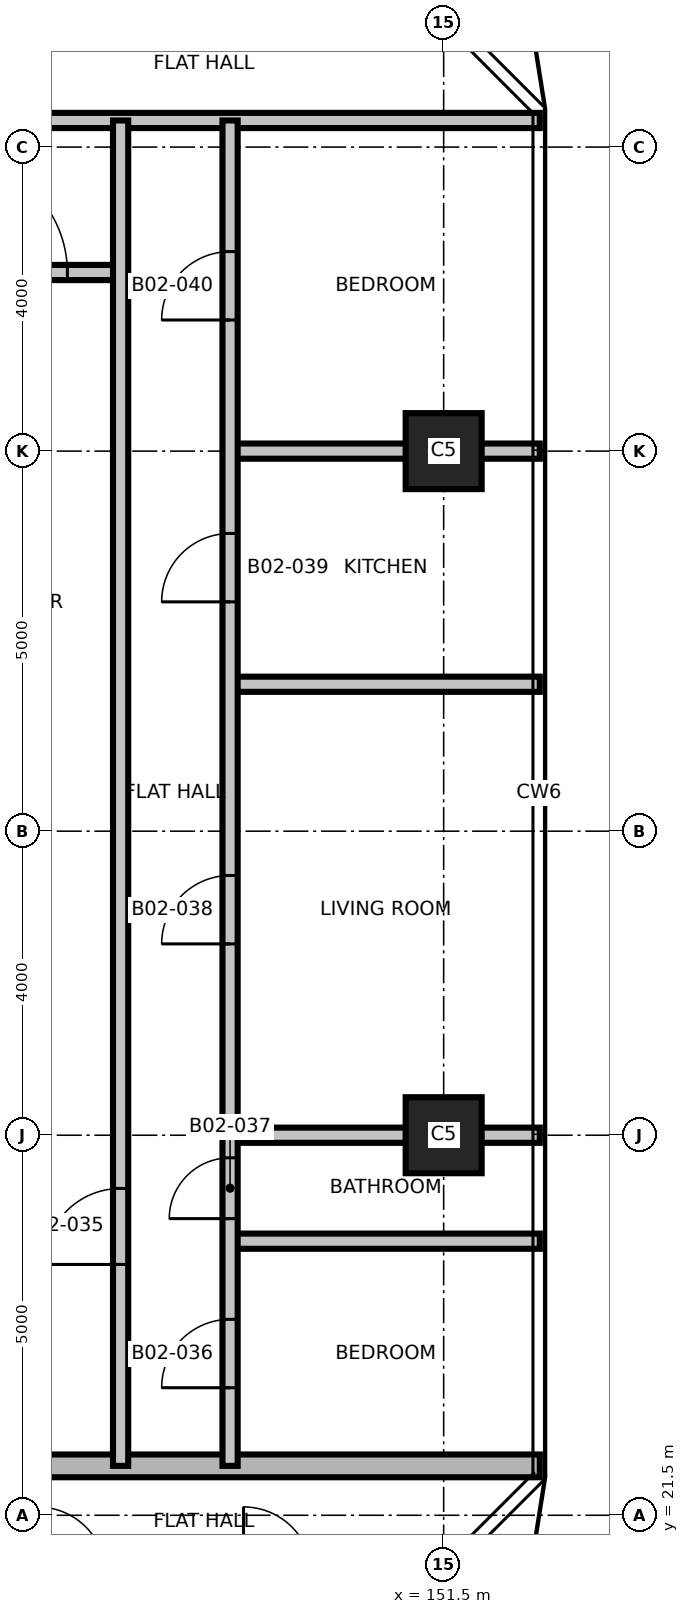
"""IFC4 building model, lengths in metres.
Left out: names, types, materials, properties, quantities, classifications, styles, units other than length and angle.
Written with IfcOpenShell. Run it as: python <this file> out.ifc"""

import sys

from ifc_helpers import new_model, si_unit, direction, frame, frame_2d, origin, origin_2d, place, context, subcontext, project, spatial, rectangle, extrude, element, fill, save


model = new_model("IFC4")
c1 = context("Model", 3, precision=1e-05, world=origin(), true_north=direction((0.0, 1.0)))
c2 = subcontext(c1, "Body", "Model", "MODEL_VIEW")
j1 = project(units=[si_unit("LENGTHUNIT", "METRE"), si_unit("PLANEANGLEUNIT", "RADIAN")], contexts=[c1])
p1 = place(None, origin())
s1 = spatial("IfcSite", under=j1, at=p1, CompositionType="ELEMENT")
p2 = place(p1, origin())
s2 = spatial("IfcBuilding", under=s1, at=p2, CompositionType="ELEMENT")
p3 = place(p2, frame((0.0, 0.0, 44.6)))
s3 = spatial("IfcBuildingStorey", under=s2, at=p3, CompositionType="ELEMENT", Elevation=44.6)
for number, where, z_axis, x_axis in (
    (1, (151.5, 26.5, 0.0), (0.0, 0.0, 1.0), (1.0, 0.0, 0.0)),
    (2, (151.5, 35.5, 0.0), (0.0, 0.0, 1.0), (1.0, 0.0, 0.0)),
):
    element("IfcColumn", number, at=place(p3, frame(where, z_axis=z_axis, x_axis=x_axis)), inside=s3, PredefinedType="COLUMN", context=c2, shape_type="SweptSolid", body=[
        extrude(rectangle(XDim=1.0, YDim=1.0, at=origin_2d()), origin(), (0.0, 0.0, 1.0), 3.7),
    ])
p4 = place(p3, frame((120.235, 22.15, 0.0), z_axis=(0.0, 0.0, 1.0), x_axis=(1.0, 0.0, 0.0)))
e3 = element("IfcWall", 3, at=p4, inside=s3, PredefinedType="SHEAR", context=c2, shape_type="SweptSolid", body=[
    extrude(rectangle(XDim=32.53, YDim=0.3, at=frame_2d((16.265, 0.0))), origin(), (0.0, 0.0, 1.0), 3.4),
])
p5 = place(p4, frame((22.515, 0.0, 0.0)))
e4 = element("IfcOpeningElement", 4, at=p5, cuts=e3, PredefinedType="OPENING", context=c2, shape_type="SweptSolid", body=[
    extrude(rectangle(XDim=1.0, YDim=2.1, at=frame_2d((0.5, 1.05))), frame((0.0, 0.16, 0.0), z_axis=(0.0, -1.0, 0.0), x_axis=(1.0, 0.0, 0.0)), (0.0, 0.0, 1.0), 0.32),
])
p6 = place(p4, frame((10.865, 0.0, 0.0)))
e5 = element("IfcOpeningElement", 5, at=p6, cuts=e3, PredefinedType="OPENING", context=c2, shape_type="SweptSolid", body=[
    extrude(rectangle(XDim=1.0, YDim=2.1, at=frame_2d((0.5, 1.05))), frame((0.0, 0.16, 0.0), z_axis=(0.0, -1.0, 0.0), x_axis=(1.0, 0.0, 0.0)), (0.0, 0.0, 1.0), 0.32),
])
p7 = place(p4, frame((24.415, 0.0, 0.0)))
e6 = element("IfcOpeningElement", 6, at=p7, cuts=e3, PredefinedType="OPENING", context=c2, shape_type="SweptSolid", body=[
    extrude(rectangle(XDim=1.0, YDim=2.1, at=frame_2d((0.5, 1.05))), frame((0.0, 0.16, 0.0), z_axis=(0.0, -1.0, 0.0), x_axis=(1.0, 0.0, 0.0)), (0.0, 0.0, 1.0), 0.32),
])
p8 = place(p4, frame((16.515, 0.0, 0.0)))
e7 = element("IfcOpeningElement", 7, at=p8, cuts=e3, PredefinedType="OPENING", context=c2, shape_type="SweptSolid", body=[
    extrude(rectangle(XDim=0.9, YDim=2.1, at=frame_2d((0.45, 1.05))), frame((0.0, 0.16, 0.0), z_axis=(0.0, -1.0, 0.0), x_axis=(1.0, 0.0, 0.0)), (0.0, 0.0, 1.0), 0.32),
])
for number, where, z_axis, x_axis in (
    (8, (148.69, 25.106, 0.0), (0.0, 0.0, 1.0), (1.0, 0.0, 0.0)),
    (9, (148.69, 26.5, 0.0), (0.0, 0.0, 1.0), (1.0, 0.0, 0.0)),
    (10, (148.69, 32.433, 0.0), (0.0, 0.0, 1.0), (1.0, 0.0, 0.0)),
    (11, (148.69, 35.5, 0.0), (0.0, 0.0, 1.0), (1.0, 0.0, 0.0)),
):
    element("IfcWall", number, at=place(p3, frame(where, z_axis=z_axis, x_axis=x_axis)), inside=s3, PredefinedType="PARTITIONING", context=c2, shape_type="SweptSolid", body=[
        extrude(rectangle(XDim=4.075, YDim=0.2, at=frame_2d((2.038, 0.0))), origin(), (0.0, 0.0, 1.0), 3.4),
    ])
p9 = place(p3, frame((144.02, 37.85, 0.0), z_axis=(0.0, 0.0, 1.0), x_axis=(1.0, 0.0, 0.0)))
e12 = element("IfcWall", 12, at=p9, inside=s3, PredefinedType="PARTITIONING", context=c2, shape_type="SweptSolid", body=[
    extrude(rectangle(XDim=3.23, YDim=0.2, at=frame_2d((1.615, 0.0))), origin(), (0.0, 0.0, 1.0), 3.4),
])
p10 = place(p9, frame((1.03, 0.0, 0.0)))
e13 = element("IfcOpeningElement", 13, at=p10, cuts=e12, PredefinedType="OPENING", context=c2, shape_type="SweptSolid", body=[
    extrude(rectangle(XDim=1.5, YDim=2.1, at=frame_2d((0.75, 1.05))), frame((0.0, 0.11, 0.0), z_axis=(0.0, -1.0, 0.0), x_axis=(1.0, 0.0, 0.0)), (0.0, 0.0, 1.0), 0.22),
])
p11 = place(p3, frame((120.235, 39.85, 0.0), z_axis=(0.0, 0.0, 1.0), x_axis=(1.0, 0.0, 0.0)))
e14 = element("IfcWall", 14, at=p11, inside=s3, PredefinedType="PARTITIONING", context=c2, shape_type="SweptSolid", body=[
    extrude(rectangle(XDim=32.53, YDim=0.2, at=frame_2d((16.265, 0.0))), origin(), (0.0, 0.0, 1.0), 3.4),
])
p12 = place(p11, frame((7.115, 0.0, 0.0)))
e15 = element("IfcOpeningElement", 15, at=p12, cuts=e14, PredefinedType="OPENING", context=c2, shape_type="SweptSolid", body=[
    extrude(rectangle(XDim=1.0, YDim=2.1, at=frame_2d((0.5, 1.05))), frame((0.0, 0.11, 0.0), z_axis=(0.0, -1.0, 0.0), x_axis=(1.0, 0.0, 0.0)), (0.0, 0.0, 1.0), 0.22),
])
p13 = place(p11, frame((15.765, 0.0, 0.0)))
e16 = element("IfcOpeningElement", 16, at=p13, cuts=e14, PredefinedType="OPENING", context=c2, shape_type="SweptSolid", body=[
    extrude(rectangle(XDim=1.0, YDim=2.1, at=frame_2d((0.5, 1.05))), frame((0.0, 0.11, 0.0), z_axis=(0.0, -1.0, 0.0), x_axis=(1.0, 0.0, 0.0)), (0.0, 0.0, 1.0), 0.22),
])
p14 = place(p11, frame((24.415, 0.0, 0.0)))
e17 = element("IfcOpeningElement", 17, at=p14, cuts=e14, PredefinedType="OPENING", context=c2, shape_type="SweptSolid", body=[
    extrude(rectangle(XDim=1.0, YDim=2.1, at=frame_2d((0.5, 1.05))), frame((0.0, 0.11, 0.0), z_axis=(0.0, -1.0, 0.0), x_axis=(1.0, 0.0, 0.0)), (0.0, 0.0, 1.0), 0.22),
])
p15 = place(p3, frame((147.25, 22.15, 0.0), z_axis=(0.0, 0.0, 1.0), x_axis=(0.0, 1.0, 0.0)))
e18 = element("IfcWall", 18, at=p15, inside=s3, PredefinedType="PARTITIONING", context=c2, shape_type="SweptSolid", body=[
    extrude(rectangle(XDim=17.7, YDim=0.2, at=frame_2d((8.85, 0.0))), origin(), (0.0, 0.0, 1.0), 3.4),
])
p16 = place(p15, frame((2.65, 0.0, 0.0)))
e19 = element("IfcOpeningElement", 19, at=p16, cuts=e18, PredefinedType="OPENING", context=c2, shape_type="SweptSolid", body=[
    extrude(rectangle(XDim=1.0, YDim=2.1, at=frame_2d((0.5, 1.05))), frame((0.0, 0.11, 0.0), z_axis=(0.0, -1.0, 0.0), x_axis=(1.0, 0.0, 0.0)), (0.0, 0.0, 1.0), 0.22),
])
p17 = place(p3, frame((148.69, 22.15, 0.0), z_axis=(0.0, 0.0, 1.0), x_axis=(0.0, 1.0, 0.0)))
e20 = element("IfcWall", 20, at=p17, inside=s3, PredefinedType="PARTITIONING", context=c2, shape_type="SweptSolid", body=[
    extrude(rectangle(XDim=17.7, YDim=0.2, at=frame_2d((8.85, 0.0))), origin(), (0.0, 0.0, 1.0), 3.4),
])
p18 = place(p17, frame((1.028, 0.0, 0.0)))
e21 = element("IfcOpeningElement", 21, at=p18, cuts=e20, PredefinedType="OPENING", context=c2, shape_type="SweptSolid", body=[
    extrude(rectangle(XDim=0.9, YDim=2.1, at=frame_2d((0.45, 1.05))), frame((0.0, 0.11, 0.0), z_axis=(0.0, -1.0, 0.0), x_axis=(1.0, 0.0, 0.0)), (0.0, 0.0, 1.0), 0.22),
])
p19 = place(p17, frame((3.253, 0.0, 0.0)))
e22 = element("IfcOpeningElement", 22, at=p19, cuts=e20, PredefinedType="OPENING", context=c2, shape_type="SweptSolid", body=[
    extrude(rectangle(XDim=0.8, YDim=2.1, at=frame_2d((0.4, 1.05))), frame((0.0, 0.11, 0.0), z_axis=(0.0, -1.0, 0.0), x_axis=(1.0, 0.0, 0.0)), (0.0, 0.0, 1.0), 0.22),
])
p20 = place(p17, frame((6.867, 0.0, 0.0)))
e23 = element("IfcOpeningElement", 23, at=p20, cuts=e20, PredefinedType="OPENING", context=c2, shape_type="SweptSolid", body=[
    extrude(rectangle(XDim=0.9, YDim=2.1, at=frame_2d((0.45, 1.05))), frame((0.0, 0.11, 0.0), z_axis=(0.0, -1.0, 0.0), x_axis=(1.0, 0.0, 0.0)), (0.0, 0.0, 1.0), 0.22),
])
p21 = place(p17, frame((11.367, 0.0, 0.0)))
e24 = element("IfcOpeningElement", 24, at=p21, cuts=e20, PredefinedType="OPENING", context=c2, shape_type="SweptSolid", body=[
    extrude(rectangle(XDim=0.9, YDim=2.1, at=frame_2d((0.45, 1.05))), frame((0.0, 0.11, 0.0), z_axis=(0.0, -1.0, 0.0), x_axis=(1.0, 0.0, 0.0)), (0.0, 0.0, 1.0), 0.22),
])
p22 = place(p17, frame((15.075, 0.0, 0.0)))
e25 = element("IfcOpeningElement", 25, at=p22, cuts=e20, PredefinedType="OPENING", context=c2, shape_type="SweptSolid", body=[
    extrude(rectangle(XDim=0.9, YDim=2.1, at=frame_2d((0.45, 1.05))), frame((0.0, 0.11, 0.0), z_axis=(0.0, -1.0, 0.0), x_axis=(1.0, 0.0, 0.0)), (0.0, 0.0, 1.0), 0.22),
])
p23 = place(p10, origin())
e26 = element("IfcDoor", 26, at=p23, inside=s3, OperationType="SINGLE_SWING_LEFT", PredefinedType="DOOR", context=c2, shape_type="SweptSolid", body=[
    extrude(rectangle(XDim=1.5, YDim=2.1, at=frame_2d((0.75, 1.05))), frame((0.0, 0.025, 0.0), z_axis=(0.0, -1.0, 0.0), x_axis=(1.0, 0.0, 0.0)), (0.0, 0.0, 1.0), 0.05),
])
fill(e13, e26)
p24 = place(p16, origin())
e27 = element("IfcDoor", 27, at=p24, inside=s3, OperationType="SINGLE_SWING_LEFT", PredefinedType="DOOR", context=c2, shape_type="SweptSolid", body=[
    extrude(rectangle(XDim=1.0, YDim=2.1, at=frame_2d((0.5, 1.05))), frame((0.0, 0.025, 0.0), z_axis=(0.0, -1.0, 0.0), x_axis=(1.0, 0.0, 0.0)), (0.0, 0.0, 1.0), 0.05),
])
fill(e19, e27)
p25 = place(p18, origin())
e28 = element("IfcDoor", 28, at=p25, inside=s3, OperationType="SINGLE_SWING_RIGHT", PredefinedType="DOOR", context=c2, shape_type="SweptSolid", body=[
    extrude(rectangle(XDim=0.9, YDim=2.1, at=frame_2d((0.45, 1.05))), frame((0.0, 0.025, 0.0), z_axis=(0.0, -1.0, 0.0), x_axis=(1.0, 0.0, 0.0)), (0.0, 0.0, 1.0), 0.05),
])
fill(e21, e28)
p26 = place(p19, origin())
e29 = element("IfcDoor", 29, at=p26, inside=s3, OperationType="SINGLE_SWING_LEFT", PredefinedType="DOOR", context=c2, shape_type="SweptSolid", body=[
    extrude(rectangle(XDim=0.8, YDim=2.1, at=frame_2d((0.4, 1.05))), frame((0.0, 0.025, 0.0), z_axis=(0.0, -1.0, 0.0), x_axis=(1.0, 0.0, 0.0)), (0.0, 0.0, 1.0), 0.05),
])
fill(e22, e29)
p27 = place(p20, origin())
e30 = element("IfcDoor", 30, at=p27, inside=s3, OperationType="SINGLE_SWING_RIGHT", PredefinedType="DOOR", context=c2, shape_type="SweptSolid", body=[
    extrude(rectangle(XDim=0.9, YDim=2.1, at=frame_2d((0.45, 1.05))), frame((0.0, 0.025, 0.0), z_axis=(0.0, -1.0, 0.0), x_axis=(1.0, 0.0, 0.0)), (0.0, 0.0, 1.0), 0.05),
])
fill(e23, e30)
p28 = place(p21, origin())
e31 = element("IfcDoor", 31, at=p28, inside=s3, OperationType="SINGLE_SWING_LEFT", PredefinedType="DOOR", context=c2, shape_type="SweptSolid", body=[
    extrude(rectangle(XDim=0.9, YDim=2.1, at=frame_2d((0.45, 1.05))), frame((0.0, 0.025, 0.0), z_axis=(0.0, -1.0, 0.0), x_axis=(1.0, 0.0, 0.0)), (0.0, 0.0, 1.0), 0.05),
])
fill(e24, e31)
p29 = place(p22, origin())
e32 = element("IfcDoor", 32, at=p29, inside=s3, OperationType="SINGLE_SWING_RIGHT", PredefinedType="DOOR", context=c2, shape_type="SweptSolid", body=[
    extrude(rectangle(XDim=0.9, YDim=2.1, at=frame_2d((0.45, 1.05))), frame((0.0, 0.025, 0.0), z_axis=(0.0, -1.0, 0.0), x_axis=(1.0, 0.0, 0.0)), (0.0, 0.0, 1.0), 0.05),
])
fill(e25, e32)
save(model, sys.argv[1])
